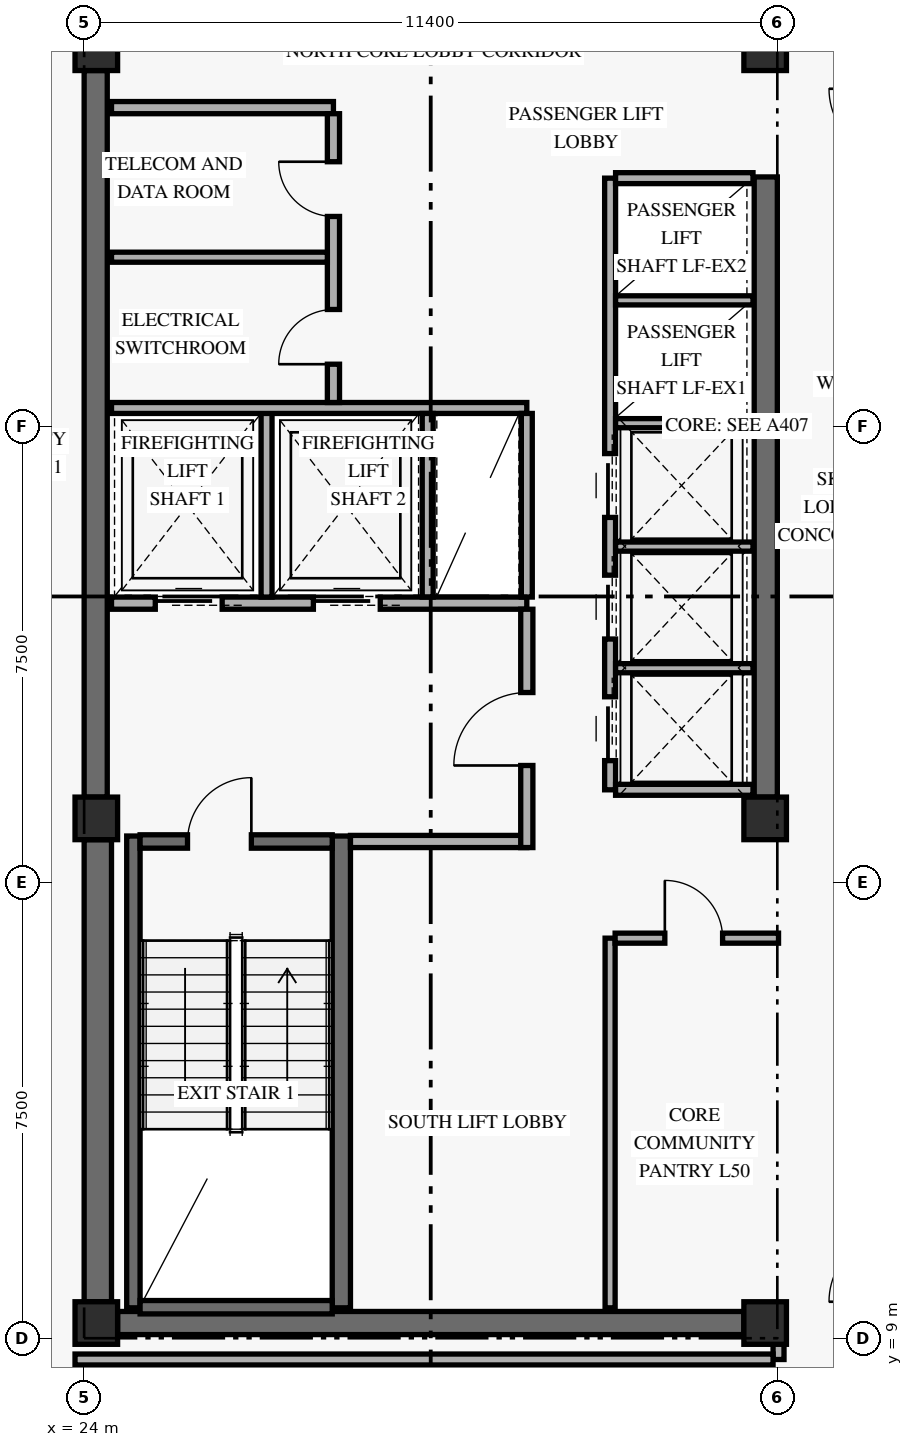
"""IFC4 building model, lengths in metres.
Left out: names, types, materials, properties, quantities, classifications, styles, units other than length and angle.
Written with IfcOpenShell. Run it as: python <this file> out.ifc"""

import sys

from ifc_helpers import new_model, si_unit, direction, frame, frame_2d, origin, origin_2d, place, context, subcontext, project, spatial, rectangle, extrude, element, fill, save


model = new_model("IFC4")
c1 = context("Model", 3, precision=1e-05, world=origin(), true_north=direction((0.0, 1.0)))
c2 = subcontext(c1, "Body", "Model", "MODEL_VIEW")
j1 = project(units=[si_unit("LENGTHUNIT", "METRE"), si_unit("PLANEANGLEUNIT", "RADIAN")], contexts=[c1])
p1 = place(None, origin())
s1 = spatial("IfcSite", under=j1, at=p1, CompositionType="ELEMENT")
p2 = place(p1, origin())
s2 = spatial("IfcBuilding", under=s1, at=p2, CompositionType="ELEMENT")
p3 = place(p2, frame((0.0, 0.0, 192.0)))
s3 = spatial("IfcBuildingStorey", under=s2, at=p3, CompositionType="ELEMENT", Elevation=192.0)
p4 = place(p3, frame((24.225, 9.6, 0.0), z_axis=(0.0, 0.0, 1.0), x_axis=(0.0, 1.0, 0.0)))
e1 = element("IfcWall", 1, at=p4, inside=s3, PredefinedType="SHEAR", context=c2, shape_type="SweptSolid", body=[
    extrude(rectangle(XDim=7.6, YDim=0.45, at=frame_2d((3.8, 0.0))), origin(), (0.0, 0.0, 1.0), 3.348),
])
p5 = place(p3, frame((24.19, 17.9, 0.0), z_axis=(0.0, 0.0, 1.0), x_axis=(0.0, 1.0, 0.0)))
e2 = element("IfcWall", 2, at=p5, inside=s3, PredefinedType="SHEAR", context=c2, shape_type="SweptSolid", body=[
    extrude(rectangle(XDim=11.95, YDim=0.38, at=frame_2d((5.975, 0.0))), origin(), (0.0, 0.0, 1.0), 3.348),
])
p6 = place(p3, frame((35.21, 17.9, 0.0), z_axis=(0.0, 0.0, 1.0), x_axis=(0.0, 1.0, 0.0)))
e3 = element("IfcWall", 3, at=p6, inside=s3, PredefinedType="SHEAR", context=c2, shape_type="SweptSolid", body=[
    extrude(rectangle(XDim=10.2, YDim=0.38, at=frame_2d((5.1, 0.0))), origin(), (0.0, 0.0, 1.0), 3.348),
])
p7 = place(p3, frame((24.55, 9.25, 0.0), z_axis=(0.0, 0.0, 1.0), x_axis=(1.0, 0.0, 0.0)))
e4 = element("IfcWall", 4, at=p7, inside=s3, PredefinedType="SHEAR", context=c2, shape_type="SweptSolid", body=[
    extrude(rectangle(XDim=10.3, YDim=0.38, at=frame_2d((5.15, 0.0))), origin(), (0.0, 0.0, 1.0), 3.96),
])
p8 = place(p3, frame((24.81, 9.5, 0.0), z_axis=(0.0, 0.0, 1.0), x_axis=(0.0, 1.0, 0.0)))
e5 = element("IfcWall", 5, at=p8, inside=s3, PredefinedType="SHEAR", context=c2, shape_type="SweptSolid", body=[
    extrude(rectangle(XDim=7.76, YDim=0.22, at=frame_2d((3.88, 0.0))), origin(), (0.0, 0.0, 1.0), 3.96),
])
p9 = place(p3, frame((28.23, 9.5, 0.0), z_axis=(0.0, 0.0, 1.0), x_axis=(0.0, 1.0, 0.0)))
e6 = element("IfcWall", 6, at=p9, inside=s3, PredefinedType="SHEAR", context=c2, shape_type="SweptSolid", body=[
    extrude(rectangle(XDim=7.76, YDim=0.3, at=frame_2d((3.88, 0.0))), origin(), (0.0, 0.0, 1.0), 3.96),
])
p10 = place(p3, frame((24.92, 9.51, 0.0), z_axis=(0.0, 0.0, 1.0), x_axis=(1.0, 0.0, 0.0)))
e7 = element("IfcWall", 7, at=p10, inside=s3, PredefinedType="SHEAR", context=c2, shape_type="SweptSolid", body=[
    extrude(rectangle(XDim=3.16, YDim=0.22, at=frame_2d((1.58, 0.0))), origin(), (0.0, 0.0, 1.0), 3.96),
])
p11 = place(p3, frame((24.92, 17.17, 0.0), z_axis=(0.0, 0.0, 1.0), x_axis=(1.0, 0.0, 0.0)))
e8 = element("IfcWall", 8, at=p11, inside=s3, PredefinedType="SHEAR", context=c2, shape_type="SweptSolid", body=[
    extrude(rectangle(XDim=3.16, YDim=0.22, at=frame_2d((1.58, 0.0))), origin(), (0.0, 0.0, 1.0), 3.96),
])
p12 = place(p11, frame((0.78, 0.0, 0.0)))
e9 = element("IfcOpeningElement", 9, at=p12, cuts=e8, PredefinedType="OPENING", context=c2, shape_type="SweptSolid", body=[
    extrude(rectangle(XDim=1.05, YDim=2.15, at=frame_2d((0.525, 1.075))), frame((0.0, 0.12, 0.0), z_axis=(0.0, -1.0, 0.0), x_axis=(1.0, 0.0, 0.0)), (0.0, 0.0, 1.0), 0.24),
])
for number, where, z_axis, x_axis in (
    (10, (24.2, 9.25, 0.0), (0.0, 0.0, 1.0), (1.0, 0.0, 0.0)),
    (11, (24.2, 17.55, 0.0), (0.0, 0.0, 1.0), (1.0, 0.0, 0.0)),
    (12, (24.2, 30.2, 0.0), (0.0, 0.0, 1.0), (1.0, 0.0, 0.0)),
    (13, (35.2, 9.25, 0.0), (0.0, 0.0, 1.0), (1.0, 0.0, 0.0)),
    (14, (35.2, 17.55, 0.0), (0.0, 0.0, 1.0), (1.0, 0.0, 0.0)),
    (15, (35.2, 30.2, 0.0), (0.0, 0.0, 1.0), (1.0, 0.0, 0.0)),
):
    element("IfcColumn", number, at=place(p3, frame(where, z_axis=z_axis, x_axis=x_axis)), inside=s3, PredefinedType="COLUMN", context=c2, shape_type="SweptSolid", body=[
        extrude(rectangle(XDim=0.7, YDim=0.7, at=origin_2d()), origin(), (0.0, 0.0, 1.0), 4.2),
    ])
p13 = place(p3, frame((24.45, 21.09, 0.0), z_axis=(0.0, 0.0, 1.0), x_axis=(1.0, 0.0, 0.0)))
e16 = element("IfcWall", 16, at=p13, inside=s3, PredefinedType="STANDARD", context=c2, shape_type="SweptSolid", body=[
    extrude(rectangle(XDim=6.83, YDim=0.2, at=frame_2d((3.415, 0.0))), origin(), (0.0, 0.0, 1.0), 3.96),
])
p14 = place(p13, frame((0.72, 0.0, 0.0)))
e17 = element("IfcOpeningElement", 17, at=p14, cuts=e16, PredefinedType="OPENING", context=c2, shape_type="SweptSolid", body=[
    extrude(rectangle(XDim=1.1, YDim=2.2, at=frame_2d((0.55, 1.1))), frame((0.0, 0.11, 0.0), z_axis=(0.0, -1.0, 0.0), x_axis=(1.0, 0.0, 0.0)), (0.0, 0.0, 1.0), 0.22),
])
p15 = place(p13, frame((3.32, 0.0, 0.0)))
e18 = element("IfcOpeningElement", 18, at=p15, cuts=e16, PredefinedType="OPENING", context=c2, shape_type="SweptSolid", body=[
    extrude(rectangle(XDim=1.1, YDim=2.2, at=frame_2d((0.55, 1.1))), frame((0.0, 0.11, 0.0), z_axis=(0.0, -1.0, 0.0), x_axis=(1.0, 0.0, 0.0)), (0.0, 0.0, 1.0), 0.22),
])
p16 = place(p3, frame((28.38, 17.17, 0.0), z_axis=(0.0, 0.0, 1.0), x_axis=(1.0, 0.0, 0.0)))
e19 = element("IfcWall", 19, at=p16, inside=s3, PredefinedType="STANDARD", context=c2, shape_type="SweptSolid", body=[
    extrude(rectangle(XDim=2.9, YDim=0.2, at=frame_2d((1.45, 0.0))), origin(), (0.0, 0.0, 1.0), 3.96),
])
p17 = place(p3, frame((31.28, 17.07, 0.0), z_axis=(0.0, 0.0, 1.0), x_axis=(0.0, 1.0, 0.0)))
e20 = element("IfcWall", 20, at=p17, inside=s3, PredefinedType="STANDARD", context=c2, shape_type="SweptSolid", body=[
    extrude(rectangle(XDim=3.92, YDim=0.2, at=frame_2d((1.96, 0.0))), origin(), (0.0, 0.0, 1.0), 3.33),
])
p18 = place(p17, frame((1.35, 0.0, 0.0)))
e21 = element("IfcOpeningElement", 21, at=p18, cuts=e20, PredefinedType="OPENING", context=c2, shape_type="SweptSolid", body=[
    extrude(rectangle(XDim=1.2, YDim=2.15, at=frame_2d((0.6, 1.075))), frame((0.0, 0.11, 0.0), z_axis=(0.0, -1.0, 0.0), x_axis=(1.0, 0.0, 0.0)), (0.0, 0.0, 1.0), 0.22),
])
p19 = place(p3, frame((27.0, 21.19, 0.0), z_axis=(0.0, 0.0, 1.0), x_axis=(0.0, 1.0, 0.0)))
e22 = element("IfcWall", 22, at=p19, inside=s3, PredefinedType="STANDARD", context=c2, shape_type="SweptSolid", body=[
    extrude(rectangle(XDim=3.11, YDim=0.18, at=frame_2d((1.555, 0.0))), origin(), (0.0, 0.0, 1.0), 3.96),
])
p20 = place(p3, frame((24.45, 24.3, 0.0), z_axis=(0.0, 0.0, 1.0), x_axis=(1.0, 0.0, 0.0)))
e23 = element("IfcWall", 23, at=p20, inside=s3, PredefinedType="STANDARD", context=c2, shape_type="SweptSolid", body=[
    extrude(rectangle(XDim=6.83, YDim=0.18, at=frame_2d((3.415, 0.0))), origin(), (0.0, 0.0, 1.0), 3.96),
])
for number, where, z_axis, x_axis in (
    (24, (29.65, 21.19, 0.0), (0.0, 0.0, 1.0), (0.0, 1.0, 0.0)),
    (25, (31.28, 21.19, 0.0), (0.0, 0.0, 1.0), (0.0, 1.0, 0.0)),
):
    element("IfcWall", number, at=place(p3, frame(where, z_axis=z_axis, x_axis=x_axis)), inside=s3, PredefinedType="STANDARD", context=c2, shape_type="SweptSolid", body=[
        extrude(rectangle(XDim=3.02, YDim=0.18, at=frame_2d((1.51, 0.0))), origin(), (0.0, 0.0, 1.0), 3.96),
    ])
p21 = place(p3, frame((24.45, 29.24, 0.0), z_axis=(0.0, 0.0, 1.0), x_axis=(1.0, 0.0, 0.0)))
e26 = element("IfcWall", 26, at=p21, inside=s3, PredefinedType="STANDARD", context=c2, shape_type="SweptSolid", body=[
    extrude(rectangle(XDim=3.65, YDim=0.2, at=frame_2d((1.825, 0.0))), origin(), (0.0, 0.0, 1.0), 3.96),
])
p22 = place(p3, frame((28.1, 24.39, 0.0), z_axis=(0.0, 0.0, 1.0), x_axis=(0.0, 1.0, 0.0)))
e27 = element("IfcWall", 27, at=p22, inside=s3, PredefinedType="STANDARD", context=c2, shape_type="SweptSolid", body=[
    extrude(rectangle(XDim=4.75, YDim=0.2, at=frame_2d((2.375, 0.0))), origin(), (0.0, 0.0, 1.0), 3.96),
])
p23 = place(p22, frame((0.63, 0.0, 0.0)))
e28 = element("IfcOpeningElement", 28, at=p23, cuts=e27, PredefinedType="OPENING", context=c2, shape_type="SweptSolid", body=[
    extrude(rectangle(XDim=0.9, YDim=2.1, at=frame_2d((0.45, 1.05))), frame((0.0, 0.11, 0.0), z_axis=(0.0, -1.0, 0.0), x_axis=(1.0, 0.0, 0.0)), (0.0, 0.0, 1.0), 0.22),
])
p24 = place(p22, frame((3.06, 0.0, 0.0)))
e29 = element("IfcOpeningElement", 29, at=p24, cuts=e27, PredefinedType="OPENING", context=c2, shape_type="SweptSolid", body=[
    extrude(rectangle(XDim=0.9, YDim=2.1, at=frame_2d((0.45, 1.05))), frame((0.0, 0.11, 0.0), z_axis=(0.0, -1.0, 0.0), x_axis=(1.0, 0.0, 0.0)), (0.0, 0.0, 1.0), 0.22),
])
p25 = place(p3, frame((24.45, 26.78, 0.0), z_axis=(0.0, 0.0, 1.0), x_axis=(1.0, 0.0, 0.0)))
e30 = element("IfcWall", 30, at=p25, inside=s3, PredefinedType="PARTITIONING", context=c2, shape_type="SweptSolid", body=[
    extrude(rectangle(XDim=3.55, YDim=0.165, at=frame_2d((1.775, 0.0))), origin(), (0.0, 0.0, 1.0), 3.96),
])
p26 = place(p3, frame((32.65, 18.02, 0.0), z_axis=(0.0, 0.0, 1.0), x_axis=(0.0, 1.0, 0.0)))
e31 = element("IfcWall", 31, at=p26, inside=s3, PredefinedType="STANDARD", context=c2, shape_type="SweptSolid", body=[
    extrude(rectangle(XDim=10.06, YDim=0.18, at=frame_2d((5.03, 0.0))), origin(), (0.0, 0.0, 1.0), 3.96),
])
p27 = place(p26, frame((0.48, 0.0, 0.0)))
e32 = element("IfcOpeningElement", 32, at=p27, cuts=e31, PredefinedType="OPENING", context=c2, shape_type="SweptSolid", body=[
    extrude(rectangle(XDim=1.05, YDim=2.2, at=frame_2d((0.525, 1.1))), frame((0.0, 0.1, 0.0), z_axis=(0.0, -1.0, 0.0), x_axis=(1.0, 0.0, 0.0)), (0.0, 0.0, 1.0), 0.2),
])
p28 = place(p26, frame((2.48, 0.0, 0.0)))
e33 = element("IfcOpeningElement", 33, at=p28, cuts=e31, PredefinedType="OPENING", context=c2, shape_type="SweptSolid", body=[
    extrude(rectangle(XDim=1.05, YDim=2.2, at=frame_2d((0.525, 1.1))), frame((0.0, 0.1, 0.0), z_axis=(0.0, -1.0, 0.0), x_axis=(1.0, 0.0, 0.0)), (0.0, 0.0, 1.0), 0.2),
])
p29 = place(p26, frame((4.48, 0.0, 0.0)))
e34 = element("IfcOpeningElement", 34, at=p29, cuts=e31, PredefinedType="OPENING", context=c2, shape_type="SweptSolid", body=[
    extrude(rectangle(XDim=1.05, YDim=2.2, at=frame_2d((0.525, 1.1))), frame((0.0, 0.1, 0.0), z_axis=(0.0, -1.0, 0.0), x_axis=(1.0, 0.0, 0.0)), (0.0, 0.0, 1.0), 0.2),
])
for number, where, z_axis, x_axis in (
    (35, (32.74, 18.02, 0.0), (0.0, 0.0, 1.0), (1.0, 0.0, 0.0)),
    (36, (32.74, 28.08, 0.0), (0.0, 0.0, 1.0), (1.0, 0.0, 0.0)),
):
    element("IfcWall", number, at=place(p3, frame(where, z_axis=z_axis, x_axis=x_axis)), inside=s3, PredefinedType="STANDARD", context=c2, shape_type="SweptSolid", body=[
        extrude(rectangle(XDim=2.26, YDim=0.18, at=frame_2d((1.13, 0.0))), origin(), (0.0, 0.0, 1.0), 3.96),
    ])
for number, where, z_axis, x_axis in (
    (37, (32.74, 20.02, 0.0), (0.0, 0.0, 1.0), (1.0, 0.0, 0.0)),
    (38, (32.74, 22.02, 0.0), (0.0, 0.0, 1.0), (1.0, 0.0, 0.0)),
    (39, (32.74, 24.05, 0.0), (0.0, 0.0, 1.0), (1.0, 0.0, 0.0)),
    (40, (32.74, 26.07, 0.0), (0.0, 0.0, 1.0), (1.0, 0.0, 0.0)),
):
    element("IfcWall", number, at=place(p3, frame(where, z_axis=z_axis, x_axis=x_axis)), inside=s3, PredefinedType="STANDARD", context=c2, shape_type="SweptSolid", body=[
        extrude(rectangle(XDim=2.26, YDim=0.15, at=frame_2d((1.13, 0.0))), origin(), (0.0, 0.0, 1.0), 3.96),
    ])
p30 = place(p3, frame((35.42, 8.65, 0.0), z_axis=(0.0, 0.0, 1.0), x_axis=(0.0, 1.0, 0.0)))
e41 = element("IfcWall", 41, at=p30, inside=s3, PredefinedType="STANDARD", context=c2, shape_type="SweptSolid", body=[
    extrude(rectangle(XDim=0.6, YDim=0.18, at=frame_2d((0.3, 0.0))), origin(), (0.0, 0.0, 1.0), 3.33),
])
p31 = place(p3, frame((32.65, 9.5, 0.0), z_axis=(0.0, 0.0, 1.0), x_axis=(0.0, 1.0, 0.0)))
e42 = element("IfcWall", 42, at=p31, inside=s3, PredefinedType="PARTITIONING", context=c2, shape_type="SweptSolid", body=[
    extrude(rectangle(XDim=6.08, YDim=0.165, at=frame_2d((3.04, 0.0))), origin(), (0.0, 0.0, 1.0), 3.96),
])
p32 = place(p3, frame((32.732, 15.58, 0.0), z_axis=(0.0, 0.0, 1.0), x_axis=(1.0, 0.0, 0.0)))
e43 = element("IfcWall", 43, at=p32, inside=s3, PredefinedType="PARTITIONING", context=c2, shape_type="SweptSolid", body=[
    extrude(rectangle(XDim=2.688, YDim=0.165, at=frame_2d((1.344, 0.0))), origin(), (0.0, 0.0, 1.0), 3.33),
])
p33 = place(p32, frame((0.817, 0.0, 0.0)))
e44 = element("IfcOpeningElement", 44, at=p33, cuts=e43, PredefinedType="OPENING", context=c2, shape_type="SweptSolid", body=[
    extrude(rectangle(XDim=0.95, YDim=2.15, at=frame_2d((0.475, 1.075))), frame((0.0, 0.093, 0.0), z_axis=(0.0, -1.0, 0.0), x_axis=(1.0, 0.0, 0.0)), (0.0, 0.0, 1.0), 0.185),
])
p34 = place(p3, frame((23.85, 8.65, 0.0), z_axis=(0.0, 0.0, 1.0), x_axis=(1.0, 0.0, 0.0)))
e45 = element("IfcWall", 45, at=p34, inside=s3, PredefinedType="STANDARD", context=c2, shape_type="SweptSolid", body=[
    extrude(rectangle(XDim=11.48, YDim=0.18, at=frame_2d((5.74, 0.0))), origin(), (0.0, 0.0, 1.0), 3.33),
])
p35 = place(p12, frame((1.05, 0.0, 0.0), z_axis=(0.0, 0.0, 1.0), x_axis=(-1.0, 0.0, 0.0)))
e46 = element("IfcDoor", 46, at=p35, inside=s3, OperationType="SINGLE_SWING_LEFT", PredefinedType="DOOR", context=c2, shape_type="SweptSolid", body=[
    extrude(rectangle(XDim=1.05, YDim=2.15, at=frame_2d((0.525, 1.075))), frame((0.0, 0.025, 0.0), z_axis=(0.0, -1.0, 0.0), x_axis=(1.0, 0.0, 0.0)), (0.0, 0.0, 1.0), 0.05),
])
fill(e9, e46)
p36 = place(p14, origin())
e47 = element("IfcDoor", 47, at=p36, inside=s3, OperationType="SLIDING_TO_LEFT", PredefinedType="DOOR", context=c2, shape_type="SweptSolid", body=[
    extrude(rectangle(XDim=1.1, YDim=2.2, at=frame_2d((0.55, 1.1))), frame((0.0, 0.025, 0.0), z_axis=(0.0, -1.0, 0.0), x_axis=(1.0, 0.0, 0.0)), (0.0, 0.0, 1.0), 0.05),
])
fill(e17, e47)
p37 = place(p15, origin())
e48 = element("IfcDoor", 48, at=p37, inside=s3, OperationType="SLIDING_TO_LEFT", PredefinedType="DOOR", context=c2, shape_type="SweptSolid", body=[
    extrude(rectangle(XDim=1.1, YDim=2.2, at=frame_2d((0.55, 1.1))), frame((0.0, 0.025, 0.0), z_axis=(0.0, -1.0, 0.0), x_axis=(1.0, 0.0, 0.0)), (0.0, 0.0, 1.0), 0.05),
])
fill(e18, e48)
p38 = place(p18, origin())
e49 = element("IfcDoor", 49, at=p38, inside=s3, OperationType="SINGLE_SWING_LEFT", PredefinedType="DOOR", context=c2, shape_type="SweptSolid", body=[
    extrude(rectangle(XDim=1.2, YDim=2.15, at=frame_2d((0.6, 1.075))), frame((0.0, 0.025, 0.0), z_axis=(0.0, -1.0, 0.0), x_axis=(1.0, 0.0, 0.0)), (0.0, 0.0, 1.0), 0.05),
])
fill(e21, e49)
p39 = place(p23, origin())
e50 = element("IfcDoor", 50, at=p39, inside=s3, OperationType="SINGLE_SWING_LEFT", PredefinedType="DOOR", context=c2, shape_type="SweptSolid", body=[
    extrude(rectangle(XDim=0.9, YDim=2.1, at=frame_2d((0.45, 1.05))), frame((0.0, 0.025, 0.0), z_axis=(0.0, -1.0, 0.0), x_axis=(1.0, 0.0, 0.0)), (0.0, 0.0, 1.0), 0.05),
])
fill(e28, e50)
p40 = place(p24, origin())
e51 = element("IfcDoor", 51, at=p40, inside=s3, OperationType="SINGLE_SWING_RIGHT", PredefinedType="DOOR", context=c2, shape_type="SweptSolid", body=[
    extrude(rectangle(XDim=0.9, YDim=2.1, at=frame_2d((0.45, 1.05))), frame((0.0, 0.025, 0.0), z_axis=(0.0, -1.0, 0.0), x_axis=(1.0, 0.0, 0.0)), (0.0, 0.0, 1.0), 0.05),
])
fill(e29, e51)
p41 = place(p27, origin())
e52 = element("IfcDoor", 52, at=p41, inside=s3, OperationType="SLIDING_TO_LEFT", PredefinedType="DOOR", context=c2, shape_type="SweptSolid", body=[
    extrude(rectangle(XDim=1.05, YDim=2.2, at=frame_2d((0.525, 1.1))), frame((0.0, 0.025, 0.0), z_axis=(0.0, -1.0, 0.0), x_axis=(1.0, 0.0, 0.0)), (0.0, 0.0, 1.0), 0.05),
])
fill(e32, e52)
p42 = place(p28, origin())
e53 = element("IfcDoor", 53, at=p42, inside=s3, OperationType="SLIDING_TO_LEFT", PredefinedType="DOOR", context=c2, shape_type="SweptSolid", body=[
    extrude(rectangle(XDim=1.05, YDim=2.2, at=frame_2d((0.525, 1.1))), frame((0.0, 0.025, 0.0), z_axis=(0.0, -1.0, 0.0), x_axis=(1.0, 0.0, 0.0)), (0.0, 0.0, 1.0), 0.05),
])
fill(e33, e53)
p43 = place(p29, origin())
e54 = element("IfcDoor", 54, at=p43, inside=s3, OperationType="SLIDING_TO_LEFT", PredefinedType="DOOR", context=c2, shape_type="SweptSolid", body=[
    extrude(rectangle(XDim=1.05, YDim=2.2, at=frame_2d((0.525, 1.1))), frame((0.0, 0.025, 0.0), z_axis=(0.0, -1.0, 0.0), x_axis=(1.0, 0.0, 0.0)), (0.0, 0.0, 1.0), 0.05),
])
fill(e34, e54)
p44 = place(p33, origin())
e55 = element("IfcDoor", 55, at=p44, inside=s3, OperationType="SINGLE_SWING_LEFT", PredefinedType="DOOR", context=c2, shape_type="SweptSolid", body=[
    extrude(rectangle(XDim=0.95, YDim=2.15, at=frame_2d((0.475, 1.075))), frame((0.0, 0.025, 0.0), z_axis=(0.0, -1.0, 0.0), x_axis=(1.0, 0.0, 0.0)), (0.0, 0.0, 1.0), 0.05),
])
fill(e44, e55)
save(model, sys.argv[1])
